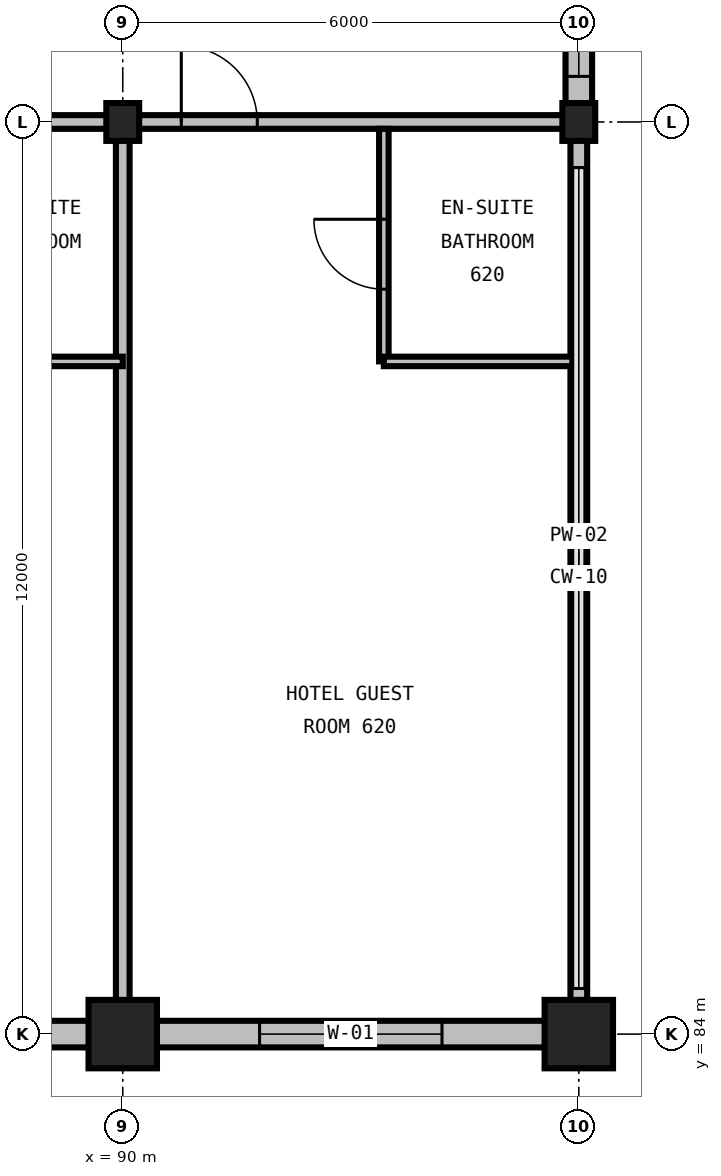
"""IFC4 building model, lengths in metres.
Left out: names, types, materials, properties, quantities, classifications, styles, units other than length and angle.
Written with IfcOpenShell. Run it as: python <this file> out.ifc"""

import sys

from ifc_helpers import new_model, si_unit, direction, frame, frame_2d, origin, origin_2d, place, context, subcontext, project, spatial, rectangle, i_section, extrude, element, fill, save


model = new_model("IFC4")
c1 = context("Model", 3, precision=1e-05, world=origin(), true_north=direction((0.0, 1.0)))
c2 = subcontext(c1, "Body", "Model", "MODEL_VIEW")
j1 = project(units=[si_unit("LENGTHUNIT", "METRE"), si_unit("PLANEANGLEUNIT", "RADIAN")], contexts=[c1])
p1 = place(None, origin())
s1 = spatial("IfcSite", under=j1, at=p1, CompositionType="ELEMENT")
p2 = place(p1, origin())
s2 = spatial("IfcBuilding", under=s1, at=p2, CompositionType="ELEMENT")
p3 = place(p2, frame((0.0, 0.0, 31.2)))
s3 = spatial("IfcBuildingStorey", under=s2, at=p3, CompositionType="ELEMENT", Elevation=31.2)
p4 = place(p3, frame((90.0, 84.0, 0.0), z_axis=(0.0, 0.0, 1.0), x_axis=(1.0, 0.0, 0.0)))
e1 = element("IfcColumn", 1, at=p4, inside=s3, PredefinedType="COLUMN", context=c2, shape_type="SweptSolid", body=[
    extrude(rectangle(XDim=0.9, YDim=0.9, at=origin_2d()), origin(), (0.0, 0.0, 1.0), 3.6),
])
p5 = place(p3, frame((90.0, 96.0, 0.0), z_axis=(0.0, 0.0, 1.0), x_axis=(1.0, 0.0, 0.0)))
e2 = element("IfcColumn", 2, at=p5, inside=s3, PredefinedType="COLUMN", context=c2, shape_type="SweptSolid", body=[
    extrude(i_section(OverallWidth=0.432, OverallDepth=0.498, WebThickness=0.056, FlangeThickness=0.089, FilletRadius=0.031, at=origin_2d()), origin(), (0.0, 0.0, 1.0), 3.6),
])
p6 = place(p3, frame((96.0, 84.0, 0.0), z_axis=(0.0, 0.0, 1.0), x_axis=(1.0, 0.0, 0.0)))
e3 = element("IfcColumn", 3, at=p6, inside=s3, PredefinedType="COLUMN", context=c2, shape_type="SweptSolid", body=[
    extrude(rectangle(XDim=0.9, YDim=0.9, at=origin_2d()), origin(), (0.0, 0.0, 1.0), 3.6),
])
p7 = place(p3, frame((96.0, 96.0, 0.0), z_axis=(0.0, 0.0, 1.0), x_axis=(1.0, 0.0, 0.0)))
e4 = element("IfcColumn", 4, at=p7, inside=s3, PredefinedType="COLUMN", context=c2, shape_type="SweptSolid", body=[
    extrude(i_section(OverallWidth=0.432, OverallDepth=0.498, WebThickness=0.056, FlangeThickness=0.089, FilletRadius=0.031, at=origin_2d()), origin(), (0.0, 0.0, 1.0), 3.6),
])
p8 = place(p3, frame((84.0, 84.0, 0.0), z_axis=(0.0, 0.0, 1.0), x_axis=(1.0, 0.0, 0.0)))
e5 = element("IfcWall", 5, at=p8, inside=s3, PredefinedType="STANDARD", context=c2, shape_type="SweptSolid", body=[
    extrude(rectangle(XDim=6.0, YDim=0.35, at=frame_2d((3.0, 0.0))), origin(), (0.0, 0.0, 1.0), 2.486),
])
p9 = place(p8, frame((1.8, 0.0, 0.75)))
e6 = element("IfcOpeningElement", 6, at=p9, cuts=e5, PredefinedType="OPENING", context=c2, shape_type="SweptSolid", body=[
    extrude(rectangle(XDim=2.4, YDim=1.65, at=frame_2d((1.2, 0.825))), frame((0.0, 0.19, 0.0), z_axis=(0.0, -1.0, 0.0), x_axis=(1.0, 0.0, 0.0)), (0.0, 0.0, 1.0), 0.38),
])
p10 = place(p3, frame((90.0, 84.0, 0.0), z_axis=(0.0, 0.0, 1.0), x_axis=(1.0, 0.0, 0.0)))
e7 = element("IfcWall", 7, at=p10, inside=s3, PredefinedType="STANDARD", context=c2, shape_type="SweptSolid", body=[
    extrude(rectangle(XDim=6.0, YDim=0.35, at=frame_2d((3.0, 0.0))), origin(), (0.0, 0.0, 1.0), 2.486),
])
p11 = place(p10, frame((1.8, 0.0, 0.75)))
e8 = element("IfcOpeningElement", 8, at=p11, cuts=e7, PredefinedType="OPENING", context=c2, shape_type="SweptSolid", body=[
    extrude(rectangle(XDim=2.4, YDim=1.65, at=frame_2d((1.2, 0.825))), frame((0.0, 0.19, 0.0), z_axis=(0.0, -1.0, 0.0), x_axis=(1.0, 0.0, 0.0)), (0.0, 0.0, 1.0), 0.38),
])
p12 = place(p3, frame((96.0, 84.0, 0.0), z_axis=(0.0, 0.0, 1.0), x_axis=(0.0, 1.0, 0.0)))
e9 = element("IfcWall", 9, at=p12, inside=s3, PredefinedType="PARAPET", context=c2, shape_type="SweptSolid", body=[
    extrude(rectangle(XDim=12.0, YDim=0.22, at=frame_2d((6.0, 0.0))), origin(), (0.0, 0.0, 1.0), 0.2),
])
p13 = place(p3, frame((96.0, 96.0, 0.0), z_axis=(0.0, 0.0, 1.0), x_axis=(0.0, 1.0, 0.0)))
e10 = element("IfcWall", 10, at=p13, inside=s3, PredefinedType="STANDARD", context=c2, shape_type="SweptSolid", body=[
    extrude(rectangle(XDim=9.0, YDim=0.35, at=frame_2d((4.5, 0.0))), origin(), (0.0, 0.0, 1.0), 2.981),
])
p14 = place(p13, frame((0.6, 0.0, 0.85)))
e11 = element("IfcOpeningElement", 11, at=p14, cuts=e10, PredefinedType="OPENING", context=c2, shape_type="SweptSolid", body=[
    extrude(rectangle(XDim=1.8, YDim=1.5, at=frame_2d((0.9, 0.75))), frame((0.0, 0.19, 0.0), z_axis=(0.0, -1.0, 0.0), x_axis=(1.0, 0.0, 0.0)), (0.0, 0.0, 1.0), 0.38),
])
p15 = place(p3, frame((84.0, 96.0, 0.0), z_axis=(0.0, 0.0, 1.0), x_axis=(1.0, 0.0, 0.0)))
e12 = element("IfcWall", 12, at=p15, inside=s3, PredefinedType="PARTITIONING", context=c2, shape_type="SweptSolid", body=[
    extrude(rectangle(XDim=6.0, YDim=0.18, at=frame_2d((3.0, 0.0))), origin(), (0.0, 0.0, 1.0), 2.736),
])
p16 = place(p15, frame((0.77, 0.0, 0.0)))
e13 = element("IfcOpeningElement", 13, at=p16, cuts=e12, PredefinedType="OPENING", context=c2, shape_type="SweptSolid", body=[
    extrude(rectangle(XDim=1.0, YDim=2.15, at=frame_2d((0.5, 1.075))), frame((0.0, 0.105, 0.0), z_axis=(0.0, -1.0, 0.0), x_axis=(1.0, 0.0, 0.0)), (0.0, 0.0, 1.0), 0.21),
])
p17 = place(p3, frame((90.0, 84.175, 0.0), z_axis=(0.0, 0.0, 1.0), x_axis=(0.0, 1.0, 0.0)))
e14 = element("IfcWall", 14, at=p17, inside=s3, PredefinedType="PARTITIONING", context=c2, shape_type="SweptSolid", body=[
    extrude(rectangle(XDim=11.825, YDim=0.18, at=frame_2d((5.913, 0.0))), origin(), (0.0, 0.0, 1.0), 2.59),
])
p18 = place(p3, frame((87.48, 92.85, 0.0), z_axis=(0.0, 0.0, 1.0), x_axis=(1.0, 0.0, 0.0)))
e15 = element("IfcWall", 15, at=p18, inside=s3, PredefinedType="PARTITIONING", context=c2, shape_type="SweptSolid", body=[
    extrude(rectangle(XDim=2.52, YDim=0.125, at=frame_2d((1.26, 0.0))), origin(), (0.0, 0.0, 1.0), 3.29),
])
p19 = place(p3, frame((90.0, 96.0, 0.0), z_axis=(0.0, 0.0, 1.0), x_axis=(1.0, 0.0, 0.0)))
e16 = element("IfcWall", 16, at=p19, inside=s3, PredefinedType="PARTITIONING", context=c2, shape_type="SweptSolid", body=[
    extrude(rectangle(XDim=5.915, YDim=0.18, at=frame_2d((2.957, 0.0))), origin(), (0.0, 0.0, 1.0), 2.736),
])
p20 = place(p19, frame((0.77, 0.0, 0.0)))
e17 = element("IfcOpeningElement", 17, at=p20, cuts=e16, PredefinedType="OPENING", context=c2, shape_type="SweptSolid", body=[
    extrude(rectangle(XDim=1.0, YDim=2.15, at=frame_2d((0.5, 1.075))), frame((0.0, 0.105, 0.0), z_axis=(0.0, -1.0, 0.0), x_axis=(1.0, 0.0, 0.0)), (0.0, 0.0, 1.0), 0.21),
])
p21 = place(p3, frame((93.435, 92.85, 0.0), z_axis=(0.0, 0.0, 1.0), x_axis=(0.0, 1.0, 0.0)))
e18 = element("IfcWall", 18, at=p21, inside=s3, PredefinedType="PARTITIONING", context=c2, shape_type="SweptSolid", body=[
    extrude(rectangle(XDim=3.06, YDim=0.125, at=frame_2d((1.53, 0.0))), origin(), (0.0, 0.0, 1.0), 3.29),
])
p22 = place(p21, frame((0.95, 0.0, 0.0)))
e19 = element("IfcOpeningElement", 19, at=p22, cuts=e18, PredefinedType="OPENING", context=c2, shape_type="SweptSolid", body=[
    extrude(rectangle(XDim=0.92, YDim=2.1, at=frame_2d((0.46, 1.05))), frame((0.0, 0.077, 0.0), z_axis=(0.0, -1.0, 0.0), x_axis=(1.0, 0.0, 0.0)), (0.0, 0.0, 1.0), 0.155),
])
p23 = place(p3, frame((93.435, 92.85, 0.0), z_axis=(0.0, 0.0, 1.0), x_axis=(1.0, 0.0, 0.0)))
e20 = element("IfcWall", 20, at=p23, inside=s3, PredefinedType="PARTITIONING", context=c2, shape_type="SweptSolid", body=[
    extrude(rectangle(XDim=2.48, YDim=0.125, at=frame_2d((1.24, 0.0))), origin(), (0.0, 0.0, 1.0), 3.29),
])
p24 = place(p11, origin())
e21 = element("IfcWindow", 21, at=p24, inside=s3, PartitioningType="DOUBLE_PANEL_VERTICAL", PredefinedType="WINDOW", context=c2, shape_type="SweptSolid", body=[
    extrude(rectangle(XDim=2.4, YDim=1.65, at=frame_2d((1.2, 0.825))), frame((0.0, 0.03, 0.0), z_axis=(0.0, -1.0, 0.0), x_axis=(1.0, 0.0, 0.0)), (0.0, 0.0, 1.0), 0.06),
])
fill(e8, e21)
p25 = place(p14, origin())
e22 = element("IfcWindow", 22, at=p25, inside=s3, PartitioningType="SINGLE_PANEL", PredefinedType="WINDOW", context=c2, shape_type="SweptSolid", body=[
    extrude(rectangle(XDim=1.8, YDim=1.5, at=frame_2d((0.9, 0.75))), frame((0.0, 0.03, 0.0), z_axis=(0.0, -1.0, 0.0), x_axis=(1.0, 0.0, 0.0)), (0.0, 0.0, 1.0), 0.06),
])
fill(e11, e22)
p26 = place(p20, origin())
e23 = element("IfcDoor", 23, at=p26, inside=s3, OperationType="SINGLE_SWING_LEFT", PredefinedType="DOOR", context=c2, shape_type="SweptSolid", body=[
    extrude(rectangle(XDim=1.0, YDim=2.15, at=frame_2d((0.5, 1.075))), frame((0.0, 0.025, 0.0), z_axis=(0.0, -1.0, 0.0), x_axis=(1.0, 0.0, 0.0)), (0.0, 0.0, 1.0), 0.05),
])
fill(e17, e23)
p27 = place(p22, origin())
e24 = element("IfcDoor", 24, at=p27, inside=s3, OperationType="SINGLE_SWING_RIGHT", PredefinedType="DOOR", context=c2, shape_type="SweptSolid", body=[
    extrude(rectangle(XDim=0.92, YDim=2.1, at=frame_2d((0.46, 1.05))), frame((0.0, 0.025, 0.0), z_axis=(0.0, -1.0, 0.0), x_axis=(1.0, 0.0, 0.0)), (0.0, 0.0, 1.0), 0.05),
])
fill(e19, e24)
save(model, sys.argv[1])
